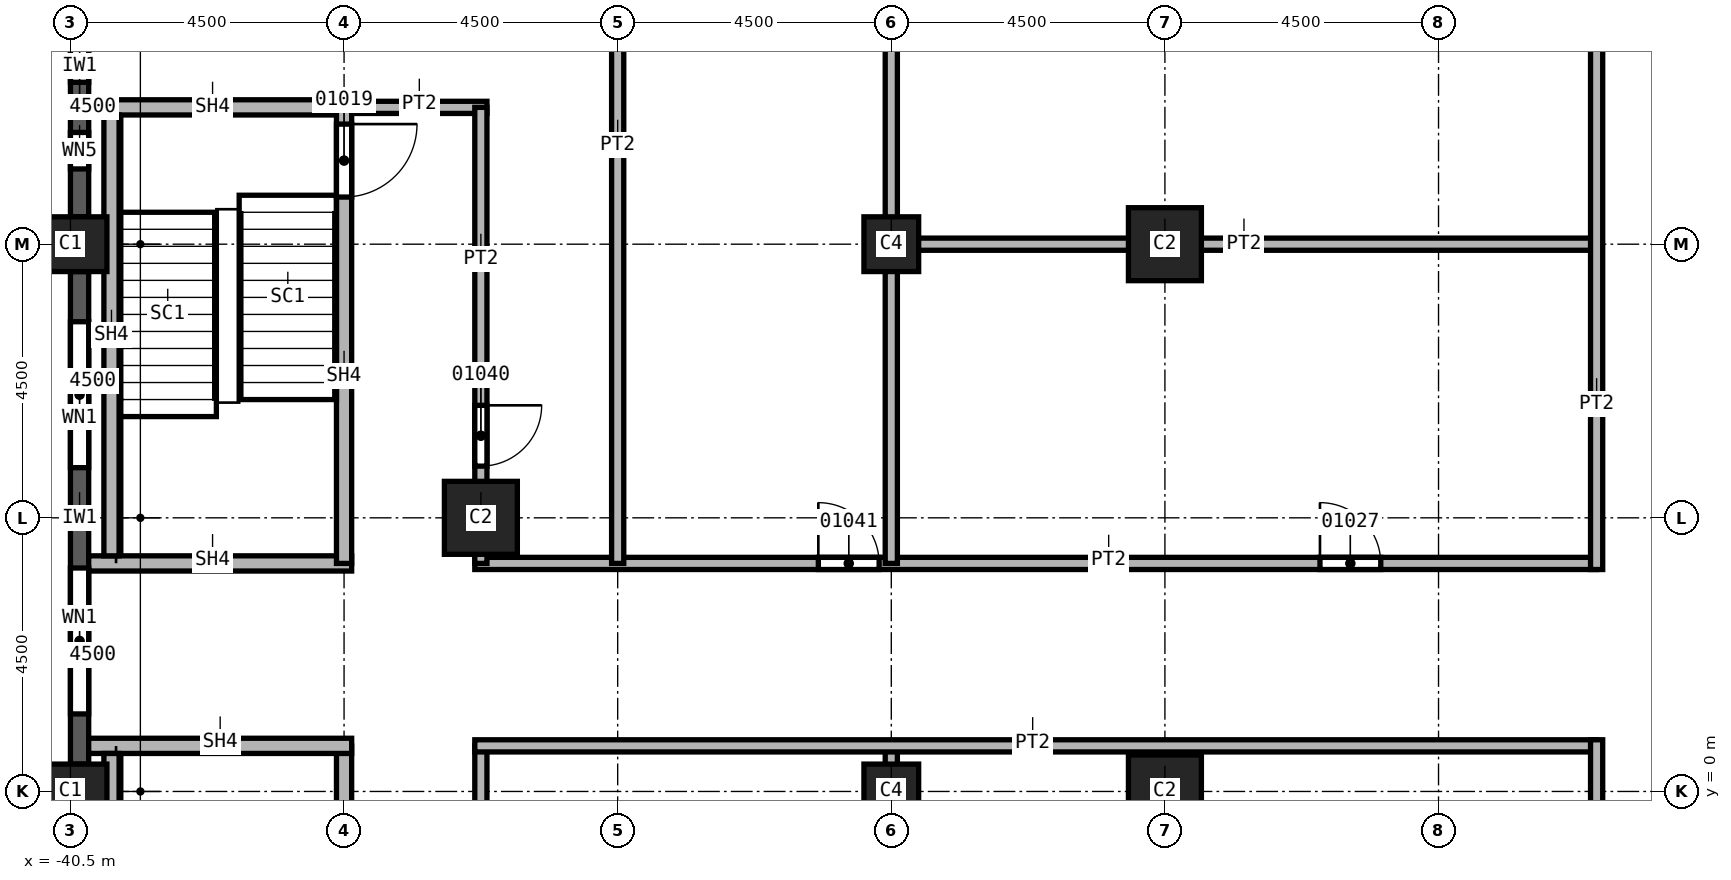
"""IFC4 building model, lengths in metres.
Left out: names, types, materials, properties, quantities, classifications, styles, units other than length and angle.
Written with IfcOpenShell. Run it as: python <this file> out.ifc"""

import sys

from ifc_helpers import new_model, si_unit, direction, frame, frame_2d, origin, origin_2d, place, context, subcontext, project, spatial, rectangle, extrude, element, fill, save


model = new_model("IFC4")
c1 = context("Model", 3, precision=1e-05, world=origin(), true_north=direction((0.0, 1.0)))
c2 = subcontext(c1, "Body", "Model", "MODEL_VIEW")
j1 = project(units=[si_unit("LENGTHUNIT", "METRE"), si_unit("PLANEANGLEUNIT", "RADIAN")], contexts=[c1])
p1 = place(None, origin())
s1 = spatial("IfcSite", under=j1, at=p1, CompositionType="ELEMENT")
p2 = place(p1, origin())
s2 = spatial("IfcBuilding", under=s1, at=p2, CompositionType="ELEMENT")
p3 = place(p2, frame((0.0, 0.0, 68.0)))
s3 = spatial("IfcBuildingStorey", under=s2, at=p3, CompositionType="ELEMENT", Elevation=68.0)
for number, where, z_axis, x_axis in (
    (1, (-40.5, 0.0, 0.0), (0.0, 0.0, 1.0), (0.0, 1.0, 0.0)),
    (2, (-40.5, 9.0, 0.0), (0.0, 0.0, 1.0), (0.0, 1.0, 0.0)),
):
    element("IfcColumn", number, at=place(p3, frame(where, z_axis=z_axis, x_axis=x_axis)), inside=s3, PredefinedType="COLUMN", context=c2, shape_type="SweptSolid", body=[
        extrude(rectangle(XDim=0.9, YDim=1.2, at=origin_2d()), origin(), (0.0, 0.0, 1.0), 3.7),
    ])
for number, where, z_axis, x_axis in (
    (3, (-33.75, 4.5, 0.0), (0.0, 0.0, 1.0), (1.0, 0.0, 0.0)),
    (4, (-22.5, 0.0, 0.0), (0.0, 0.0, 1.0), (1.0, 0.0, 0.0)),
    (5, (-22.5, 9.0, 0.0), (0.0, 0.0, 1.0), (1.0, 0.0, 0.0)),
):
    element("IfcColumn", number, at=place(p3, frame(where, z_axis=z_axis, x_axis=x_axis)), inside=s3, PredefinedType="COLUMN", context=c2, shape_type="SweptSolid", body=[
        extrude(rectangle(XDim=1.2, YDim=1.2, at=origin_2d()), origin(), (0.0, 0.0, 1.0), 3.7),
    ])
for number, where, z_axis, x_axis in (
    (6, (-27.0, 0.0, 0.0), (0.0, 0.0, 1.0), (1.0, 0.0, 0.0)),
    (7, (-27.0, 9.0, 0.0), (0.0, 0.0, 1.0), (1.0, 0.0, 0.0)),
):
    element("IfcColumn", number, at=place(p3, frame(where, z_axis=z_axis, x_axis=x_axis)), inside=s3, PredefinedType="COLUMN", context=c2, shape_type="SweptSolid", body=[
        extrude(rectangle(XDim=0.9, YDim=0.9, at=origin_2d()), origin(), (0.0, 0.0, 1.0), 3.7),
    ])
p4 = place(p3, frame((-40.35, 13.05, 0.0), z_axis=(0.0, 0.0, 1.0), x_axis=(0.0, -1.0, 0.0)))
e8 = element("IfcWall", 8, at=p4, inside=s3, PredefinedType="SOLIDWALL", context=c2, shape_type="SweptSolid", body=[
    extrude(rectangle(XDim=3.6, YDim=0.3, at=frame_2d((1.8, 0.0))), origin(), (0.0, 0.0, 1.0), 3.1),
])
p5 = place(p4, frame((0.788, 0.0, 0.8)))
e9 = element("IfcOpeningElement", 9, at=p5, cuts=e8, PredefinedType="OPENING", context=c2, shape_type="SweptSolid", body=[
    extrude(rectangle(XDim=0.6, YDim=1.95, at=frame_2d((0.3, 0.975))), frame((0.0, 0.15, 0.0), z_axis=(0.0, -1.0, 0.0), x_axis=(1.0, 0.0, 0.0)), (0.0, 0.0, 1.0), 0.3),
])
p6 = place(p4, frame((2.212, 0.0, 0.8)))
e10 = element("IfcOpeningElement", 10, at=p6, cuts=e8, PredefinedType="OPENING", context=c2, shape_type="SweptSolid", body=[
    extrude(rectangle(XDim=0.6, YDim=1.95, at=frame_2d((0.3, 0.975))), frame((0.0, 0.15, 0.0), z_axis=(0.0, -1.0, 0.0), x_axis=(1.0, 0.0, 0.0)), (0.0, 0.0, 1.0), 0.3),
])
p7 = place(p3, frame((-40.35, 8.55, 0.0), z_axis=(0.0, 0.0, 1.0), x_axis=(0.0, -1.0, 0.0)))
e11 = element("IfcWall", 11, at=p7, inside=s3, PredefinedType="SOLIDWALL", context=c2, shape_type="SweptSolid", body=[
    extrude(rectangle(XDim=8.1, YDim=0.3, at=frame_2d((4.05, 0.0))), origin(), (0.0, 0.0, 1.0), 3.1),
])
p8 = place(p7, frame((0.825, 0.0, 0.8)))
e12 = element("IfcOpeningElement", 12, at=p8, cuts=e11, PredefinedType="OPENING", context=c2, shape_type="SweptSolid", body=[
    extrude(rectangle(XDim=2.4, YDim=1.95, at=frame_2d((1.2, 0.975))), frame((0.0, 0.15, 0.0), z_axis=(0.0, -1.0, 0.0), x_axis=(1.0, 0.0, 0.0)), (0.0, 0.0, 1.0), 0.3),
])
p9 = place(p7, frame((4.875, 0.0, 0.8)))
e13 = element("IfcOpeningElement", 13, at=p9, cuts=e11, PredefinedType="OPENING", context=c2, shape_type="SweptSolid", body=[
    extrude(rectangle(XDim=2.4, YDim=1.95, at=frame_2d((1.2, 0.975))), frame((0.0, 0.15, 0.0), z_axis=(0.0, -1.0, 0.0), x_axis=(1.0, 0.0, 0.0)), (0.0, 0.0, 1.0), 0.3),
])
p10 = place(p3, frame((-36.0, 11.25, 0.0), z_axis=(0.0, 0.0, 1.0), x_axis=(1.0, 0.0, 0.0)))
e14 = element("IfcWall", 14, at=p10, inside=s3, PredefinedType="PARTITIONING", context=c2, shape_type="SweptSolid", body=[
    extrude(rectangle(XDim=2.35, YDim=0.2, at=frame_2d((1.175, 0.0))), origin(), (0.0, 0.0, 1.0), 3.7),
])
p11 = place(p3, frame((-33.85, 3.75, 0.0), z_axis=(0.0, 0.0, 1.0), x_axis=(1.0, 0.0, 0.0)))
e15 = element("IfcWall", 15, at=p11, inside=s3, PredefinedType="PARTITIONING", context=c2, shape_type="SweptSolid", body=[
    extrude(rectangle(XDim=18.45, YDim=0.2, at=frame_2d((9.225, 0.0))), origin(), (0.0, 0.0, 1.0), 3.7),
])
p12 = place(p11, frame((13.9, 0.0, 0.0)))
e16 = element("IfcOpeningElement", 16, at=p12, cuts=e15, PredefinedType="OPENING", context=c2, shape_type="SweptSolid", body=[
    extrude(rectangle(XDim=1.0, YDim=2.1, at=frame_2d((0.5, 1.05))), frame((0.0, 0.1, 0.0), z_axis=(0.0, -1.0, 0.0), x_axis=(1.0, 0.0, 0.0)), (0.0, 0.0, 1.0), 0.2),
])
p13 = place(p11, frame((5.65, 0.0, 0.0)))
e17 = element("IfcOpeningElement", 17, at=p13, cuts=e15, PredefinedType="OPENING", context=c2, shape_type="SweptSolid", body=[
    extrude(rectangle(XDim=1.0, YDim=2.1, at=frame_2d((0.5, 1.05))), frame((0.0, 0.1, 0.0), z_axis=(0.0, -1.0, 0.0), x_axis=(1.0, 0.0, 0.0)), (0.0, 0.0, 1.0), 0.2),
])
p14 = place(p3, frame((-33.75, 0.75, 0.0), z_axis=(0.0, 0.0, 1.0), x_axis=(0.0, -1.0, 0.0)))
e18 = element("IfcWall", 18, at=p14, inside=s3, PredefinedType="PARTITIONING", context=c2, shape_type="SweptSolid", body=[
    extrude(rectangle(XDim=18.45, YDim=0.2, at=frame_2d((9.225, 0.0))), origin(), (0.0, 0.0, 1.0), 3.7),
])
p15 = place(p14, frame((3.25, 0.0, 0.0)))
e19 = element("IfcOpeningElement", 19, at=p15, cuts=e18, PredefinedType="OPENING", context=c2, shape_type="SweptSolid", body=[
    extrude(rectangle(XDim=1.0, YDim=2.1, at=frame_2d((0.5, 1.05))), frame((0.0, 0.1, 0.0), z_axis=(0.0, -1.0, 0.0), x_axis=(1.0, 0.0, 0.0)), (0.0, 0.0, 1.0), 0.2),
])
p16 = place(p3, frame((-33.75, 11.25, 0.0), z_axis=(0.0, 0.0, 1.0), x_axis=(0.0, -1.0, 0.0)))
e20 = element("IfcWall", 20, at=p16, inside=s3, PredefinedType="PARTITIONING", context=c2, shape_type="SweptSolid", body=[
    extrude(rectangle(XDim=7.5, YDim=0.2, at=frame_2d((3.75, 0.0))), origin(), (0.0, 0.0, 1.0), 3.7),
])
p17 = place(p16, frame((4.9, 0.0, 0.0)))
e21 = element("IfcOpeningElement", 21, at=p17, cuts=e20, PredefinedType="OPENING", context=c2, shape_type="SweptSolid", body=[
    extrude(rectangle(XDim=1.0, YDim=2.1, at=frame_2d((0.5, 1.05))), frame((0.0, 0.1, 0.0), z_axis=(0.0, -1.0, 0.0), x_axis=(1.0, 0.0, 0.0)), (0.0, 0.0, 1.0), 0.2),
])
p18 = place(p3, frame((-31.5, 17.4, 0.0), z_axis=(0.0, 0.0, 1.0), x_axis=(0.0, -1.0, 0.0)))
e22 = element("IfcWall", 22, at=p18, inside=s3, PredefinedType="PARTITIONING", context=c2, shape_type="SweptSolid", body=[
    extrude(rectangle(XDim=13.65, YDim=0.2, at=frame_2d((6.825, 0.0))), origin(), (0.0, 0.0, 1.0), 3.7),
])
p19 = place(p3, frame((-27.1, 9.0, 0.0), z_axis=(0.0, 0.0, 1.0), x_axis=(1.0, 0.0, 0.0)))
e23 = element("IfcWall", 23, at=p19, inside=s3, PredefinedType="PARTITIONING", context=c2, shape_type="SweptSolid", body=[
    extrude(rectangle(XDim=11.7, YDim=0.2, at=frame_2d((5.85, 0.0))), origin(), (0.0, 0.0, 1.0), 3.7),
])
p20 = place(p3, frame((-27.0, -17.4, 0.0), z_axis=(0.0, 0.0, 1.0), x_axis=(0.0, 1.0, 0.0)))
e24 = element("IfcWall", 24, at=p20, inside=s3, PredefinedType="PARTITIONING", context=c2, shape_type="SweptSolid", body=[
    extrude(rectangle(XDim=18.15, YDim=0.2, at=frame_2d((9.075, 0.0))), origin(), (0.0, 0.0, 1.0), 3.7),
])
p21 = place(p3, frame((-27.0, 3.75, 0.0), z_axis=(0.0, 0.0, 1.0), x_axis=(0.0, 1.0, 0.0)))
e25 = element("IfcWall", 25, at=p21, inside=s3, PredefinedType="PARTITIONING", context=c2, shape_type="SweptSolid", body=[
    extrude(rectangle(XDim=13.65, YDim=0.2, at=frame_2d((6.825, 0.0))), origin(), (0.0, 0.0, 1.0), 3.7),
])
p22 = place(p3, frame((-15.4, 0.75, 0.0), z_axis=(0.0, 0.0, 1.0), x_axis=(-1.0, 0.0, 0.0)))
e26 = element("IfcWall", 26, at=p22, inside=s3, PredefinedType="PARTITIONING", context=c2, shape_type="SweptSolid", body=[
    extrude(rectangle(XDim=18.45, YDim=0.2, at=frame_2d((9.225, 0.0))), origin(), (0.0, 0.0, 1.0), 3.7),
])
p23 = place(p3, frame((-15.4, -24.5, 0.0), z_axis=(0.0, 0.0, 1.0), x_axis=(0.0, 1.0, 0.0)))
e27 = element("IfcWall", 27, at=p23, inside=s3, PredefinedType="PARTITIONING", context=c2, shape_type="SweptSolid", body=[
    extrude(rectangle(XDim=25.35, YDim=0.2, at=frame_2d((12.675, 0.0))), origin(), (0.0, 0.0, 1.0), 3.7),
])
p24 = place(p23, frame((1.15, 0.0, 0.0)))
e28 = element("IfcOpeningElement", 28, at=p24, cuts=e27, PredefinedType="OPENING", context=c2, shape_type="SweptSolid", body=[
    extrude(rectangle(XDim=1.0, YDim=2.1, at=frame_2d((0.5, 1.05))), frame((0.0, 0.1, 0.0), z_axis=(0.0, -1.0, 0.0), x_axis=(1.0, 0.0, 0.0)), (0.0, 0.0, 1.0), 0.2),
])
p25 = place(p23, frame((3.4, 0.0, 0.0)))
e29 = element("IfcOpeningElement", 29, at=p25, cuts=e27, PredefinedType="OPENING", context=c2, shape_type="SweptSolid", body=[
    extrude(rectangle(XDim=1.0, YDim=2.1, at=frame_2d((0.5, 1.05))), frame((0.0, 0.1, 0.0), z_axis=(0.0, -1.0, 0.0), x_axis=(1.0, 0.0, 0.0)), (0.0, 0.0, 1.0), 0.2),
])
p26 = place(p23, frame((6.65, 0.0, 0.0)))
e30 = element("IfcOpeningElement", 30, at=p26, cuts=e27, PredefinedType="OPENING", context=c2, shape_type="SweptSolid", body=[
    extrude(rectangle(XDim=1.0, YDim=2.1, at=frame_2d((0.5, 1.05))), frame((0.0, 0.1, 0.0), z_axis=(0.0, -1.0, 0.0), x_axis=(1.0, 0.0, 0.0)), (0.0, 0.0, 1.0), 0.2),
])
p27 = place(p23, frame((14.9, 0.0, 0.0)))
e31 = element("IfcOpeningElement", 31, at=p27, cuts=e27, PredefinedType="OPENING", context=c2, shape_type="SweptSolid", body=[
    extrude(rectangle(XDim=1.0, YDim=2.1, at=frame_2d((0.5, 1.05))), frame((0.0, 0.1, 0.0), z_axis=(0.0, -1.0, 0.0), x_axis=(1.0, 0.0, 0.0)), (0.0, 0.0, 1.0), 0.2),
])
p28 = place(p3, frame((-15.4, 3.65, 0.0), z_axis=(0.0, 0.0, 1.0), x_axis=(0.0, 1.0, 0.0)))
e32 = element("IfcWall", 32, at=p28, inside=s3, PredefinedType="PARTITIONING", context=c2, shape_type="SweptSolid", body=[
    extrude(rectangle(XDim=9.95, YDim=0.2, at=frame_2d((4.975, 0.0))), origin(), (0.0, 0.0, 1.0), 3.7),
])
p29 = place(p3, frame((-40.2, 3.75, 0.0), z_axis=(0.0, 0.0, 1.0), x_axis=(1.0, 0.0, 0.0)))
e33 = element("IfcWall", 33, at=p29, inside=s3, PredefinedType="SOLIDWALL", context=c2, shape_type="SweptSolid", body=[
    extrude(rectangle(XDim=4.325, YDim=0.25, at=frame_2d((2.163, 0.0))), origin(), (0.0, 0.0, 1.0), 3.7),
])
p30 = place(p3, frame((-40.2, 11.25, 0.0), z_axis=(0.0, 0.0, 1.0), x_axis=(1.0, 0.0, 0.0)))
e34 = element("IfcWall", 34, at=p30, inside=s3, PredefinedType="SOLIDWALL", context=c2, shape_type="SweptSolid", body=[
    extrude(rectangle(XDim=4.2, YDim=0.25, at=frame_2d((2.1, 0.0))), origin(), (0.0, 0.0, 1.0), 3.7),
])
p31 = place(p3, frame((-36.0, 0.75, 0.0), z_axis=(0.0, 0.0, 1.0), x_axis=(0.0, -1.0, 0.0)))
e35 = element("IfcWall", 35, at=p31, inside=s3, PredefinedType="SOLIDWALL", context=c2, shape_type="SweptSolid", body=[
    extrude(rectangle(XDim=7.625, YDim=0.25, at=frame_2d((3.812, 0.0))), origin(), (0.0, 0.0, 1.0), 3.7),
])
p32 = place(p31, frame((5.95, 0.0, 0.0)))
e36 = element("IfcOpeningElement", 36, at=p32, cuts=e35, PredefinedType="OPENING", context=c2, shape_type="SweptSolid", body=[
    extrude(rectangle(XDim=1.2, YDim=2.1, at=frame_2d((0.6, 1.05))), frame((0.0, 0.125, 0.0), z_axis=(0.0, -1.0, 0.0), x_axis=(1.0, 0.0, 0.0)), (0.0, 0.0, 1.0), 0.25),
])
p33 = place(p3, frame((-36.0, 11.375, 0.0), z_axis=(0.0, 0.0, 1.0), x_axis=(0.0, -1.0, 0.0)))
e37 = element("IfcWall", 37, at=p33, inside=s3, PredefinedType="SOLIDWALL", context=c2, shape_type="SweptSolid", body=[
    extrude(rectangle(XDim=7.625, YDim=0.25, at=frame_2d((3.812, 0.0))), origin(), (0.0, 0.0, 1.0), 3.7),
])
p34 = place(p33, frame((0.4, 0.0, 0.0)))
e38 = element("IfcOpeningElement", 38, at=p34, cuts=e37, PredefinedType="OPENING", context=c2, shape_type="SweptSolid", body=[
    extrude(rectangle(XDim=1.2, YDim=2.1, at=frame_2d((0.6, 1.05))), frame((0.0, 0.125, 0.0), z_axis=(0.0, -1.0, 0.0), x_axis=(1.0, 0.0, 0.0)), (0.0, 0.0, 1.0), 0.25),
])
p35 = place(p3, frame((-35.875, 0.75, 0.0), z_axis=(0.0, 0.0, 1.0), x_axis=(-1.0, 0.0, 0.0)))
e39 = element("IfcWall", 39, at=p35, inside=s3, PredefinedType="SOLIDWALL", context=c2, shape_type="SweptSolid", body=[
    extrude(rectangle(XDim=4.325, YDim=0.25, at=frame_2d((2.163, 0.0))), origin(), (0.0, 0.0, 1.0), 3.7),
])
for number, where, z_axis, x_axis in (
    (40, (-39.825, 3.875, 0.0), (0.0, 0.0, 1.0), (0.0, 1.0, 0.0)),
    (41, (-39.825, -6.625, 0.0), (0.0, 0.0, 1.0), (0.0, 1.0, 0.0)),
):
    element("IfcWall", number, at=place(p3, frame(where, z_axis=z_axis, x_axis=x_axis)), inside=s3, PredefinedType="SOLIDWALL", context=c2, shape_type="SweptSolid", body=[
        extrude(rectangle(XDim=7.25, YDim=0.25, at=frame_2d((3.625, 0.0))), origin(), (0.0, 0.0, 1.0), 3.7),
    ])
p36 = place(p8, origin())
e42 = element("IfcWindow", 42, at=p36, inside=s3, PartitioningType="SINGLE_PANEL", PredefinedType="WINDOW", context=c2, shape_type="SweptSolid", body=[
    extrude(rectangle(XDim=2.4, YDim=1.95, at=frame_2d((1.2, 0.975))), frame((0.0, 0.03, 0.0), z_axis=(0.0, -1.0, 0.0), x_axis=(1.0, 0.0, 0.0)), (0.0, 0.0, 1.0), 0.06),
])
fill(e12, e42)
p37 = place(p9, origin())
e43 = element("IfcWindow", 43, at=p37, inside=s3, PartitioningType="SINGLE_PANEL", PredefinedType="WINDOW", context=c2, shape_type="SweptSolid", body=[
    extrude(rectangle(XDim=2.4, YDim=1.95, at=frame_2d((1.2, 0.975))), frame((0.0, 0.03, 0.0), z_axis=(0.0, -1.0, 0.0), x_axis=(1.0, 0.0, 0.0)), (0.0, 0.0, 1.0), 0.06),
])
fill(e13, e43)
p38 = place(p34, origin())
e44 = element("IfcDoor", 44, at=p38, inside=s3, OperationType="SINGLE_SWING_RIGHT", PredefinedType="DOOR", context=c2, shape_type="SweptSolid", body=[
    extrude(rectangle(XDim=1.2, YDim=2.1, at=frame_2d((0.6, 1.05))), frame((0.0, 0.025, 0.0), z_axis=(0.0, -1.0, 0.0), x_axis=(1.0, 0.0, 0.0)), (0.0, 0.0, 1.0), 0.05),
])
fill(e38, e44)
p39 = place(p12, origin())
e45 = element("IfcDoor", 45, at=p39, inside=s3, OperationType="SINGLE_SWING_RIGHT", PredefinedType="DOOR", context=c2, shape_type="SweptSolid", body=[
    extrude(rectangle(XDim=1.0, YDim=2.1, at=frame_2d((0.5, 1.05))), frame((0.0, 0.025, 0.0), z_axis=(0.0, -1.0, 0.0), x_axis=(1.0, 0.0, 0.0)), (0.0, 0.0, 1.0), 0.05),
])
fill(e16, e45)
p40 = place(p17, origin())
e46 = element("IfcDoor", 46, at=p40, inside=s3, OperationType="SINGLE_SWING_LEFT", PredefinedType="DOOR", context=c2, shape_type="SweptSolid", body=[
    extrude(rectangle(XDim=1.0, YDim=2.1, at=frame_2d((0.5, 1.05))), frame((0.0, 0.025, 0.0), z_axis=(0.0, -1.0, 0.0), x_axis=(1.0, 0.0, 0.0)), (0.0, 0.0, 1.0), 0.05),
])
fill(e21, e46)
p41 = place(p13, origin())
e47 = element("IfcDoor", 47, at=p41, inside=s3, OperationType="SINGLE_SWING_RIGHT", PredefinedType="DOOR", context=c2, shape_type="SweptSolid", body=[
    extrude(rectangle(XDim=1.0, YDim=2.1, at=frame_2d((0.5, 1.05))), frame((0.0, 0.025, 0.0), z_axis=(0.0, -1.0, 0.0), x_axis=(1.0, 0.0, 0.0)), (0.0, 0.0, 1.0), 0.05),
])
fill(e17, e47)
p42 = place(p5, origin())
e48 = element("IfcWindow", 48, at=p42, inside=s3, PartitioningType="SINGLE_PANEL", PredefinedType="WINDOW", context=c2, shape_type="SweptSolid", body=[
    extrude(rectangle(XDim=0.6, YDim=1.95, at=frame_2d((0.3, 0.975))), frame((0.0, 0.03, 0.0), z_axis=(0.0, -1.0, 0.0), x_axis=(1.0, 0.0, 0.0)), (0.0, 0.0, 1.0), 0.06),
])
fill(e9, e48)
p43 = place(p6, origin())
e49 = element("IfcWindow", 49, at=p43, inside=s3, PartitioningType="SINGLE_PANEL", PredefinedType="WINDOW", context=c2, shape_type="SweptSolid", body=[
    extrude(rectangle(XDim=0.6, YDim=1.95, at=frame_2d((0.3, 0.975))), frame((0.0, 0.03, 0.0), z_axis=(0.0, -1.0, 0.0), x_axis=(1.0, 0.0, 0.0)), (0.0, 0.0, 1.0), 0.06),
])
fill(e10, e49)
save(model, sys.argv[1])
